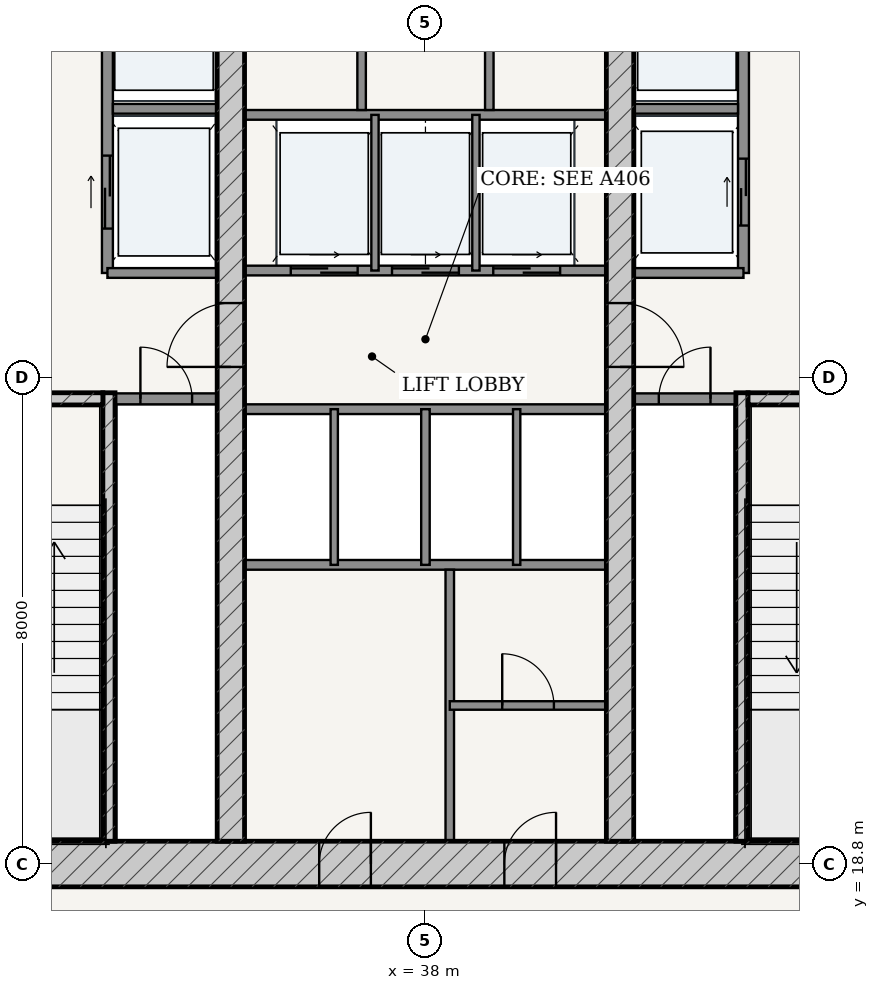
"""IFC4 building model, lengths in metres.
Left out: names, types, materials, properties, quantities, classifications, styles, units other than length and angle.
Written with IfcOpenShell. Run it as: python <this file> out.ifc"""

import sys

from ifc_helpers import new_model, si_unit, direction, frame, frame_2d, origin, place, context, subcontext, project, spatial, rectangle, extrude, source, transform, mapped, element, fill, save


model = new_model("IFC4")
c1 = context("Model", 3, precision=1e-05, world=origin(), true_north=direction((-0.2419218956, 0.970295726276)))
c2 = subcontext(c1, "Body", "Model", "MODEL_VIEW")
j1 = project(units=[si_unit("LENGTHUNIT", "METRE"), si_unit("PLANEANGLEUNIT", "RADIAN")], contexts=[c1])
p1 = place(None, origin())
s1 = spatial("IfcSite", under=j1, at=p1, CompositionType="ELEMENT")
p2 = place(p1, origin())
s2 = spatial("IfcBuilding", under=s1, at=p2, CompositionType="ELEMENT")
p3 = place(p2, frame((0.0, 0.0, 14.4)))
s3 = spatial("IfcBuildingStorey", under=s2, at=p3, CompositionType="ELEMENT", Elevation=14.4)
p4 = place(p3, frame((28.625, 18.8, 0.0), z_axis=(0.0, 0.0, 1.0), x_axis=(1.0, 0.0, 0.0)))
e1 = element("IfcWall", 1, at=p4, inside=s3, PredefinedType="SHEAR", context=c2, shape_type="SweptSolid", body=[
    extrude(rectangle(XDim=18.75, YDim=0.75, at=frame_2d((9.375, 0.0))), origin(), (0.0, 0.0, 1.0), 4.05),
])
p5 = place(p4, frame((7.627, 0.0, 0.0)))
e2 = element("IfcOpeningElement", 2, at=p5, cuts=e1, PredefinedType="OPENING", context=c2, shape_type="SweptSolid", body=[
    extrude(rectangle(XDim=0.85, YDim=2.1, at=frame_2d((0.425, 1.05))), frame((0.0, 0.385, 0.0), z_axis=(0.0, -1.0, 0.0), x_axis=(1.0, 0.0, 0.0)), (0.0, 0.0, 1.0), 0.77),
])
p6 = place(p4, frame((10.673, 0.0, 0.0)))
e3 = element("IfcOpeningElement", 3, at=p6, cuts=e1, PredefinedType="OPENING", context=c2, shape_type="SweptSolid", body=[
    extrude(rectangle(XDim=0.85, YDim=2.1, at=frame_2d((0.425, 1.05))), frame((0.0, 0.385, 0.0), z_axis=(0.0, -1.0, 0.0), x_axis=(1.0, 0.0, 0.0)), (0.0, 0.0, 1.0), 0.77),
])
p7 = place(p3, frame((32.795, 19.175, 0.0), z_axis=(0.0, 0.0, 1.0), x_axis=(0.0, 1.0, 0.0)))
e4 = element("IfcWall", 4, at=p7, inside=s3, PredefinedType="SOLIDWALL", context=c2, shape_type="SweptSolid", body=[
    extrude(rectangle(XDim=7.375, YDim=0.2, at=frame_2d((3.688, 0.0))), origin(), (0.0, 0.0, 1.0), 4.05),
])
p8 = place(p3, frame((29.375, 26.45, 0.0), z_axis=(0.0, 0.0, 1.0), x_axis=(1.0, 0.0, 0.0)))
e5 = element("IfcWall", 5, at=p8, inside=s3, PredefinedType="SOLIDWALL", context=c2, shape_type="SweptSolid", body=[
    extrude(rectangle(XDim=3.32, YDim=0.2, at=frame_2d((1.66, 0.0))), origin(), (0.0, 0.0, 1.0), 4.05),
])
p9 = place(p8, frame((1.185, 0.0, 0.0)))
e6 = element("IfcOpeningElement", 6, at=p9, cuts=e5, PredefinedType="OPENING", context=c2, shape_type="SweptSolid", body=[
    extrude(rectangle(XDim=0.95, YDim=2.15, at=frame_2d((0.475, 1.075))), frame((0.0, 0.11, 0.0), z_axis=(0.0, -1.0, 0.0), x_axis=(1.0, 0.0, 0.0)), (0.0, 0.0, 1.0), 0.22),
])
p10 = place(p3, frame((43.205, 19.175, 0.0), z_axis=(0.0, 0.0, 1.0), x_axis=(0.0, 1.0, 0.0)))
e7 = element("IfcWall", 7, at=p10, inside=s3, PredefinedType="SOLIDWALL", context=c2, shape_type="SweptSolid", body=[
    extrude(rectangle(XDim=7.375, YDim=0.2, at=frame_2d((3.688, 0.0))), origin(), (0.0, 0.0, 1.0), 4.05),
])
p11 = place(p3, frame((43.305, 26.45, 0.0), z_axis=(0.0, 0.0, 1.0), x_axis=(1.0, 0.0, 0.0)))
e8 = element("IfcWall", 8, at=p11, inside=s3, PredefinedType="SOLIDWALL", context=c2, shape_type="SweptSolid", body=[
    extrude(rectangle(XDim=3.32, YDim=0.2, at=frame_2d((1.66, 0.0))), origin(), (0.0, 0.0, 1.0), 4.05),
])
p12 = place(p11, frame((1.185, 0.0, 0.0)))
e9 = element("IfcOpeningElement", 9, at=p12, cuts=e8, PredefinedType="OPENING", context=c2, shape_type="SweptSolid", body=[
    extrude(rectangle(XDim=0.95, YDim=2.15, at=frame_2d((0.475, 1.075))), frame((0.0, 0.11, 0.0), z_axis=(0.0, -1.0, 0.0), x_axis=(1.0, 0.0, 0.0)), (0.0, 0.0, 1.0), 0.22),
])
p13 = place(p3, frame((34.8, 19.175, 0.0), z_axis=(0.0, 0.0, 1.0), x_axis=(0.0, 1.0, 0.0)))
e10 = element("IfcWall", 10, at=p13, inside=s3, PredefinedType="SHEAR", context=c2, shape_type="SweptSolid", body=[
    extrude(rectangle(XDim=15.25, YDim=0.45, at=frame_2d((7.625, 0.0))), origin(), (0.0, 0.0, 1.0), 4.05),
])
p14 = place(p13, frame((7.8, 0.0, 0.0)))
e11 = element("IfcOpeningElement", 11, at=p14, cuts=e10, PredefinedType="OPENING", context=c2, shape_type="SweptSolid", body=[
    extrude(rectangle(XDim=1.05, YDim=2.15, at=frame_2d((0.525, 1.075))), frame((0.0, 0.235, 0.0), z_axis=(0.0, -1.0, 0.0), x_axis=(1.0, 0.0, 0.0)), (0.0, 0.0, 1.0), 0.47),
])
p15 = place(p3, frame((41.2, 19.175, 0.0), z_axis=(0.0, 0.0, 1.0), x_axis=(0.0, 1.0, 0.0)))
e12 = element("IfcWall", 12, at=p15, inside=s3, PredefinedType="SHEAR", context=c2, shape_type="SweptSolid", body=[
    extrude(rectangle(XDim=15.25, YDim=0.45, at=frame_2d((7.625, 0.0))), origin(), (0.0, 0.0, 1.0), 4.05),
])
p16 = place(p15, frame((7.8, 0.0, 0.0)))
e13 = element("IfcOpeningElement", 13, at=p16, cuts=e12, PredefinedType="OPENING", context=c2, shape_type="SweptSolid", body=[
    extrude(rectangle(XDim=1.05, YDim=2.15, at=frame_2d((0.525, 1.075))), frame((0.0, 0.235, 0.0), z_axis=(0.0, -1.0, 0.0), x_axis=(1.0, 0.0, 0.0)), (0.0, 0.0, 1.0), 0.47),
])
p17 = place(p3, frame((32.9, 26.45, 0.0), z_axis=(0.0, 0.0, 1.0), x_axis=(1.0, 0.0, 0.0)))
e14 = element("IfcWall", 14, at=p17, inside=s3, PredefinedType="PARTITIONING", context=c2, shape_type="SweptSolid", body=[
    extrude(rectangle(XDim=1.675, YDim=0.18, at=frame_2d((0.837, 0.0))), origin(), (0.0, 0.0, 1.0), 4.05),
])
p18 = place(p17, frame((0.413, 0.0, 0.0)))
e15 = element("IfcOpeningElement", 15, at=p18, cuts=e14, PredefinedType="OPENING", context=c2, shape_type="SweptSolid", body=[
    extrude(rectangle(XDim=0.85, YDim=2.1, at=frame_2d((0.425, 1.05))), frame((0.0, 0.1, 0.0), z_axis=(0.0, -1.0, 0.0), x_axis=(1.0, 0.0, 0.0)), (0.0, 0.0, 1.0), 0.2),
])
p19 = place(p3, frame((41.425, 26.45, 0.0), z_axis=(0.0, 0.0, 1.0), x_axis=(1.0, 0.0, 0.0)))
e16 = element("IfcWall", 16, at=p19, inside=s3, PredefinedType="PARTITIONING", context=c2, shape_type="SweptSolid", body=[
    extrude(rectangle(XDim=1.675, YDim=0.18, at=frame_2d((0.837, 0.0))), origin(), (0.0, 0.0, 1.0), 4.05),
])
p20 = place(p19, frame((0.413, 0.0, 0.0)))
e17 = element("IfcOpeningElement", 17, at=p20, cuts=e16, PredefinedType="OPENING", context=c2, shape_type="SweptSolid", body=[
    extrude(rectangle(XDim=0.85, YDim=2.1, at=frame_2d((0.425, 1.05))), frame((0.0, 0.1, 0.0), z_axis=(0.0, -1.0, 0.0), x_axis=(1.0, 0.0, 0.0)), (0.0, 0.0, 1.0), 0.2),
])
p21 = place(p3, frame((32.77, 28.52, 0.0), z_axis=(0.0, 0.0, 1.0), x_axis=(0.0, 1.0, 0.0)))
e18 = element("IfcWall", 18, at=p21, inside=s3, PredefinedType="PARTITIONING", context=c2, shape_type="SweptSolid", body=[
    extrude(rectangle(XDim=5.905, YDim=0.18, at=frame_2d((2.953, 0.0))), origin(), (0.0, 0.0, 1.0), 4.05),
])
p22 = place(p21, frame((3.655, 0.0, 0.0)))
e19 = element("IfcOpeningElement", 19, at=p22, cuts=e18, PredefinedType="OPENING", context=c2, shape_type="SweptSolid", body=[
    extrude(rectangle(XDim=1.15, YDim=2.2, at=frame_2d((0.575, 1.1))), frame((0.0, 0.1, 0.0), z_axis=(0.0, -1.0, 0.0), x_axis=(1.0, 0.0, 0.0)), (0.0, 0.0, 1.0), 0.2),
])
p23 = place(p21, frame((0.73, 0.0, 0.0)))
e20 = element("IfcOpeningElement", 20, at=p23, cuts=e18, PredefinedType="OPENING", context=c2, shape_type="SweptSolid", body=[
    extrude(rectangle(XDim=1.2, YDim=2.25, at=frame_2d((0.6, 1.125))), frame((0.0, 0.1, 0.0), z_axis=(0.0, -1.0, 0.0), x_axis=(1.0, 0.0, 0.0)), (0.0, 0.0, 1.0), 0.2),
])
p24 = place(p3, frame((32.86, 31.22, 0.0), z_axis=(0.0, 0.0, 1.0), x_axis=(1.0, 0.0, 0.0)))
e21 = element("IfcWall", 21, at=p24, inside=s3, PredefinedType="PARTITIONING", context=c2, shape_type="SweptSolid", body=[
    extrude(rectangle(XDim=1.715, YDim=0.16, at=frame_2d((0.857, 0.0))), origin(), (0.0, 0.0, 1.0), 4.05),
])
p25 = place(p3, frame((32.77, 28.52, 0.0), z_axis=(0.0, 0.0, 1.0), x_axis=(1.0, 0.0, 0.0)))
e22 = element("IfcWall", 22, at=p25, inside=s3, PredefinedType="PARTITIONING", context=c2, shape_type="SweptSolid", body=[
    extrude(rectangle(XDim=1.805, YDim=0.16, at=frame_2d((0.902, 0.0))), origin(), (0.0, 0.0, 1.0), 4.05),
])
p26 = place(p3, frame((43.23, 28.52, 0.0), z_axis=(0.0, 0.0, 1.0), x_axis=(0.0, 1.0, 0.0)))
e23 = element("IfcWall", 23, at=p26, inside=s3, PredefinedType="PARTITIONING", context=c2, shape_type="SweptSolid", body=[
    extrude(rectangle(XDim=5.905, YDim=0.18, at=frame_2d((2.953, 0.0))), origin(), (0.0, 0.0, 1.0), 4.05),
])
p27 = place(p26, frame((3.655, 0.0, 0.0)))
e24 = element("IfcOpeningElement", 24, at=p27, cuts=e23, PredefinedType="OPENING", context=c2, shape_type="SweptSolid", body=[
    extrude(rectangle(XDim=1.15, YDim=2.2, at=frame_2d((0.575, 1.1))), frame((0.0, 0.1, 0.0), z_axis=(0.0, -1.0, 0.0), x_axis=(1.0, 0.0, 0.0)), (0.0, 0.0, 1.0), 0.2),
])
p28 = place(p26, frame((0.78, 0.0, 0.0)))
e25 = element("IfcOpeningElement", 25, at=p28, cuts=e23, PredefinedType="OPENING", context=c2, shape_type="SweptSolid", body=[
    extrude(rectangle(XDim=1.1, YDim=2.2, at=frame_2d((0.55, 1.1))), frame((0.0, 0.1, 0.0), z_axis=(0.0, -1.0, 0.0), x_axis=(1.0, 0.0, 0.0)), (0.0, 0.0, 1.0), 0.2),
])
p29 = place(p3, frame((41.425, 31.22, 0.0), z_axis=(0.0, 0.0, 1.0), x_axis=(1.0, 0.0, 0.0)))
e26 = element("IfcWall", 26, at=p29, inside=s3, PredefinedType="PARTITIONING", context=c2, shape_type="SweptSolid", body=[
    extrude(rectangle(XDim=1.715, YDim=0.16, at=frame_2d((0.857, 0.0))), origin(), (0.0, 0.0, 1.0), 4.05),
])
p30 = place(p3, frame((41.425, 28.52, 0.0), z_axis=(0.0, 0.0, 1.0), x_axis=(1.0, 0.0, 0.0)))
e27 = element("IfcWall", 27, at=p30, inside=s3, PredefinedType="PARTITIONING", context=c2, shape_type="SweptSolid", body=[
    extrude(rectangle(XDim=1.805, YDim=0.16, at=frame_2d((0.902, 0.0))), origin(), (0.0, 0.0, 1.0), 4.05),
])
p31 = place(p3, frame((35.025, 28.56, 0.0), z_axis=(0.0, 0.0, 1.0), x_axis=(1.0, 0.0, 0.0)))
e28 = element("IfcWall", 28, at=p31, inside=s3, PredefinedType="PARTITIONING", context=c2, shape_type="SweptSolid", body=[
    extrude(rectangle(XDim=5.95, YDim=0.16, at=frame_2d((2.975, 0.0))), origin(), (0.0, 0.0, 1.0), 4.05),
])
p32 = place(p31, frame((0.76, 0.0, 0.0)))
e29 = element("IfcOpeningElement", 29, at=p32, cuts=e28, PredefinedType="OPENING", context=c2, shape_type="SweptSolid", body=[
    extrude(rectangle(XDim=1.1, YDim=2.2, at=frame_2d((0.55, 1.1))), frame((0.0, 0.09, 0.0), z_axis=(0.0, -1.0, 0.0), x_axis=(1.0, 0.0, 0.0)), (0.0, 0.0, 1.0), 0.18),
])
p33 = place(p31, frame((2.425, 0.0, 0.0)))
e30 = element("IfcOpeningElement", 30, at=p33, cuts=e28, PredefinedType="OPENING", context=c2, shape_type="SweptSolid", body=[
    extrude(rectangle(XDim=1.1, YDim=2.2, at=frame_2d((0.55, 1.1))), frame((0.0, 0.09, 0.0), z_axis=(0.0, -1.0, 0.0), x_axis=(1.0, 0.0, 0.0)), (0.0, 0.0, 1.0), 0.18),
])
p34 = place(p31, frame((4.09, 0.0, 0.0)))
e31 = element("IfcOpeningElement", 31, at=p34, cuts=e28, PredefinedType="OPENING", context=c2, shape_type="SweptSolid", body=[
    extrude(rectangle(XDim=1.1, YDim=2.2, at=frame_2d((0.55, 1.1))), frame((0.0, 0.09, 0.0), z_axis=(0.0, -1.0, 0.0), x_axis=(1.0, 0.0, 0.0)), (0.0, 0.0, 1.0), 0.18),
])
p35 = place(p3, frame((35.025, 31.12, 0.0), z_axis=(0.0, 0.0, 1.0), x_axis=(1.0, 0.0, 0.0)))
e32 = element("IfcWall", 32, at=p35, inside=s3, PredefinedType="PARTITIONING", context=c2, shape_type="SweptSolid", body=[
    extrude(rectangle(XDim=5.95, YDim=0.16, at=frame_2d((2.975, 0.0))), origin(), (0.0, 0.0, 1.0), 4.05),
])
for number, where, z_axis, x_axis in (
    (33, (37.17, 28.56, 0.0), (0.0, 0.0, 1.0), (0.0, 1.0, 0.0)),
    (34, (38.83, 28.56, 0.0), (0.0, 0.0, 1.0), (0.0, 1.0, 0.0)),
):
    element("IfcWall", number, at=place(p3, frame(where, z_axis=z_axis, x_axis=x_axis)), inside=s3, PredefinedType="PARTITIONING", context=c2, shape_type="SweptSolid", body=[
        extrude(rectangle(XDim=2.56, YDim=0.12, at=frame_2d((1.28, 0.0))), origin(), (0.0, 0.0, 1.0), 4.05),
    ])
for number, where, z_axis, x_axis in (
    (35, (36.95, 31.2, 0.0), (0.0, 0.0, 1.0), (0.0, 1.0, 0.0)),
    (36, (39.05, 31.2, 0.0), (0.0, 0.0, 1.0), (0.0, 1.0, 0.0)),
):
    element("IfcWall", number, at=place(p3, frame(where, z_axis=z_axis, x_axis=x_axis)), inside=s3, PredefinedType="PARTITIONING", context=c2, shape_type="SweptSolid", body=[
        extrude(rectangle(XDim=3.225, YDim=0.14, at=frame_2d((1.613, 0.0))), origin(), (0.0, 0.0, 1.0), 4.05),
    ])
for number, where, z_axis, x_axis in (
    (37, (35.025, 26.28, 0.0), (0.0, 0.0, 1.0), (1.0, 0.0, 0.0)),
    (38, (35.025, 23.72, 0.0), (0.0, 0.0, 1.0), (1.0, 0.0, 0.0)),
):
    element("IfcWall", number, at=place(p3, frame(where, z_axis=z_axis, x_axis=x_axis)), inside=s3, PredefinedType="PARTITIONING", context=c2, shape_type="SweptSolid", body=[
        extrude(rectangle(XDim=5.95, YDim=0.16, at=frame_2d((2.975, 0.0))), origin(), (0.0, 0.0, 1.0), 4.05),
    ])
p36 = place(p3, frame((36.5, 23.72, 0.0), z_axis=(0.0, 0.0, 1.0), x_axis=(0.0, 1.0, 0.0)))
e39 = element("IfcWall", 39, at=p36, inside=s3, PredefinedType="PARTITIONING", context=c2, shape_type="SweptSolid", body=[
    extrude(rectangle(XDim=2.56, YDim=0.12, at=frame_2d((1.28, 0.0))), origin(), (0.0, 0.0, 1.0), 4.05),
])
p37 = place(p3, frame((38.0, 23.72, 0.0), z_axis=(0.0, 0.0, 1.0), x_axis=(0.0, 1.0, 0.0)))
e40 = element("IfcWall", 40, at=p37, inside=s3, PredefinedType="PARTITIONING", context=c2, shape_type="SweptSolid", body=[
    extrude(rectangle(XDim=2.56, YDim=0.14, at=frame_2d((1.28, 0.0))), origin(), (0.0, 0.0, 1.0), 4.05),
])
p38 = place(p3, frame((39.5, 23.72, 0.0), z_axis=(0.0, 0.0, 1.0), x_axis=(0.0, 1.0, 0.0)))
e41 = element("IfcWall", 41, at=p38, inside=s3, PredefinedType="PARTITIONING", context=c2, shape_type="SweptSolid", body=[
    extrude(rectangle(XDim=2.56, YDim=0.12, at=frame_2d((1.28, 0.0))), origin(), (0.0, 0.0, 1.0), 4.05),
])
p39 = place(p3, frame((38.4, 19.175, 0.0), z_axis=(0.0, 0.0, 1.0), x_axis=(0.0, 1.0, 0.0)))
e42 = element("IfcWall", 42, at=p39, inside=s3, PredefinedType="PARTITIONING", context=c2, shape_type="SweptSolid", body=[
    extrude(rectangle(XDim=4.465, YDim=0.14, at=frame_2d((2.232, 0.0))), origin(), (0.0, 0.0, 1.0), 4.05),
])
p40 = place(p3, frame((38.4, 21.407, 0.0), z_axis=(0.0, 0.0, 1.0), x_axis=(1.0, 0.0, 0.0)))
e43 = element("IfcWall", 43, at=p40, inside=s3, PredefinedType="PARTITIONING", context=c2, shape_type="SweptSolid", body=[
    extrude(rectangle(XDim=2.575, YDim=0.14, at=frame_2d((1.288, 0.0))), origin(), (0.0, 0.0, 1.0), 4.05),
])
p41 = place(p40, frame((0.863, 0.0, 0.0)))
e44 = element("IfcOpeningElement", 44, at=p41, cuts=e43, PredefinedType="OPENING", context=c2, shape_type="SweptSolid", body=[
    extrude(rectangle(XDim=0.85, YDim=2.1, at=frame_2d((0.425, 1.05))), frame((0.0, 0.08, 0.0), z_axis=(0.0, -1.0, 0.0), x_axis=(1.0, 0.0, 0.0)), (0.0, 0.0, 1.0), 0.16),
])
m1 = source(origin(), c2, "Body", "SweptSolid", [
    extrude(rectangle(XDim=1.05, YDim=2.15, at=frame_2d((0.525, 1.075))), frame((0.0, 0.025, 0.0), z_axis=(0.0, -1.0, 0.0), x_axis=(1.0, 0.0, 0.0)), (0.0, 0.0, 1.0), 0.05),
])
p42 = place(p14, origin())
e45 = element("IfcDoor", 45, at=p42, inside=s3, OperationType="SINGLE_SWING_LEFT", PredefinedType="DOOR", context=c2, shape_type="MappedRepresentation", body=[
    mapped(m1, transform((0.0, 0.0, 0.0), scale=1.0)),
])
fill(e11, e45)
p43 = place(p16, frame((1.05, 0.0, 0.0), z_axis=(0.0, 0.0, 1.0), x_axis=(-1.0, 0.0, 0.0)))
e46 = element("IfcDoor", 46, at=p43, inside=s3, OperationType="SINGLE_SWING_RIGHT", PredefinedType="DOOR", context=c2, shape_type="MappedRepresentation", body=[
    mapped(m1, transform((0.0, 0.0, 0.0), scale=1.0)),
])
fill(e13, e46)
m2 = source(origin(), c2, "Body", "SweptSolid", [
    extrude(rectangle(XDim=0.85, YDim=2.1, at=frame_2d((0.425, 1.05))), frame((0.0, 0.025, 0.0), z_axis=(0.0, -1.0, 0.0), x_axis=(1.0, 0.0, 0.0)), (0.0, 0.0, 1.0), 0.05),
])
p44 = place(p18, origin())
e47 = element("IfcDoor", 47, at=p44, inside=s3, OperationType="SINGLE_SWING_LEFT", PredefinedType="DOOR", context=c2, shape_type="MappedRepresentation", body=[
    mapped(m2, transform((0.0, 0.0, 0.0), scale=1.0)),
])
fill(e15, e47)
p45 = place(p20, origin())
e48 = element("IfcDoor", 48, at=p45, inside=s3, OperationType="SINGLE_SWING_RIGHT", PredefinedType="DOOR", context=c2, shape_type="MappedRepresentation", body=[
    mapped(m2, transform((0.0, 0.0, 0.0), scale=1.0)),
])
fill(e17, e48)
p46 = place(p5, origin())
e49 = element("IfcDoor", 49, at=p46, inside=s3, OperationType="SINGLE_SWING_RIGHT", PredefinedType="DOOR", context=c2, shape_type="MappedRepresentation", body=[
    mapped(m2, transform((0.0, 0.0, 0.0), scale=1.0)),
])
fill(e2, e49)
p47 = place(p6, origin())
e50 = element("IfcDoor", 50, at=p47, inside=s3, OperationType="SINGLE_SWING_RIGHT", PredefinedType="DOOR", context=c2, shape_type="MappedRepresentation", body=[
    mapped(m2, transform((0.0, 0.0, 0.0), scale=1.0)),
])
fill(e3, e50)
p48 = place(p41, origin())
e51 = element("IfcDoor", 51, at=p48, inside=s3, OperationType="SINGLE_SWING_LEFT", PredefinedType="DOOR", context=c2, shape_type="MappedRepresentation", body=[
    mapped(m2, transform((0.0, 0.0, 0.0), scale=1.0)),
])
fill(e44, e51)
m3 = source(origin(), c2, "Body", "SweptSolid", [
    extrude(rectangle(XDim=1.2, YDim=2.25, at=frame_2d((0.6, 1.125))), frame((0.0, 0.025, 0.0), z_axis=(0.0, -1.0, 0.0), x_axis=(1.0, 0.0, 0.0)), (0.0, 0.0, 1.0), 0.05),
])
p49 = place(p23, origin())
e52 = element("IfcDoor", 52, at=p49, inside=s3, OperationType="DOUBLE_DOOR_SLIDING", PredefinedType="DOOR", context=c2, shape_type="MappedRepresentation", body=[
    mapped(m3, transform((0.0, 0.0, 0.0), scale=1.0)),
])
fill(e20, e52)
m4 = source(origin(), c2, "Body", "SweptSolid", [
    extrude(rectangle(XDim=1.1, YDim=2.2, at=frame_2d((0.55, 1.1))), frame((0.0, 0.025, 0.0), z_axis=(0.0, -1.0, 0.0), x_axis=(1.0, 0.0, 0.0)), (0.0, 0.0, 1.0), 0.05),
])
p50 = place(p28, origin())
e53 = element("IfcDoor", 53, at=p50, inside=s3, OperationType="DOUBLE_DOOR_SLIDING", PredefinedType="DOOR", context=c2, shape_type="MappedRepresentation", body=[
    mapped(m4, transform((0.0, 0.0, 0.0), scale=1.0)),
])
fill(e25, e53)
p51 = place(p32, origin())
e54 = element("IfcDoor", 54, at=p51, inside=s3, OperationType="DOUBLE_DOOR_SLIDING", PredefinedType="DOOR", context=c2, shape_type="MappedRepresentation", body=[
    mapped(m4, transform((0.0, 0.0, 0.0), scale=1.0)),
])
fill(e29, e54)
p52 = place(p33, origin())
e55 = element("IfcDoor", 55, at=p52, inside=s3, OperationType="DOUBLE_DOOR_SLIDING", PredefinedType="DOOR", context=c2, shape_type="MappedRepresentation", body=[
    mapped(m4, transform((0.0, 0.0, 0.0), scale=1.0)),
])
fill(e30, e55)
p53 = place(p34, origin())
e56 = element("IfcDoor", 56, at=p53, inside=s3, OperationType="DOUBLE_DOOR_SLIDING", PredefinedType="DOOR", context=c2, shape_type="MappedRepresentation", body=[
    mapped(m4, transform((0.0, 0.0, 0.0), scale=1.0)),
])
fill(e31, e56)
save(model, sys.argv[1])
